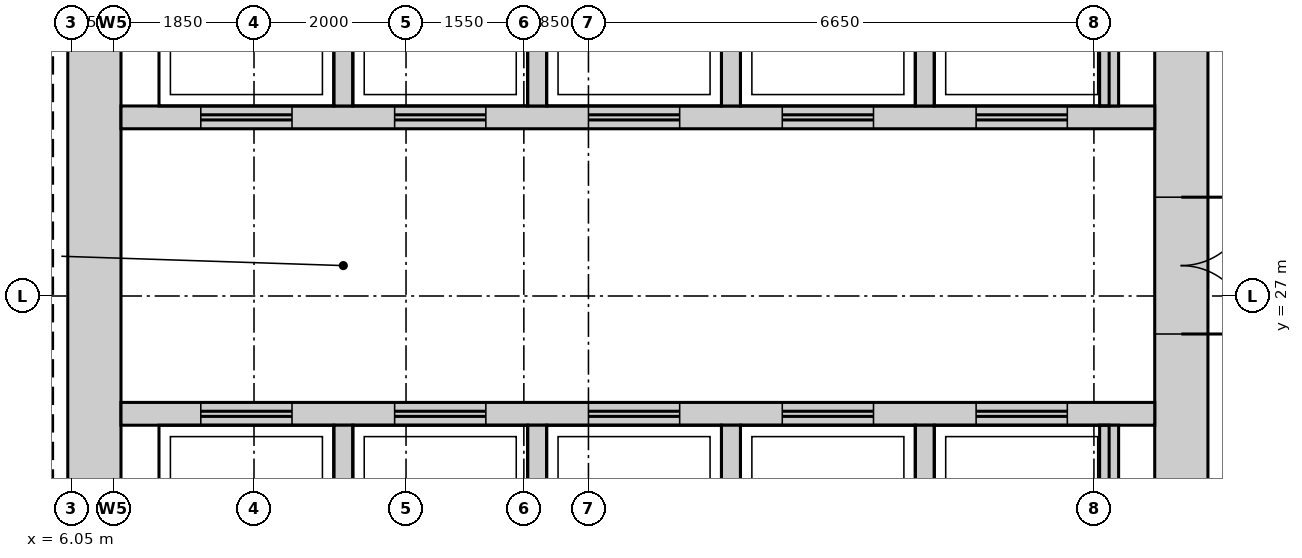
"""IFC4 building model, lengths in metres.
Left out: names, types, materials, properties, quantities, classifications, styles, units other than length and angle.
Written with IfcOpenShell. Run it as: python <this file> out.ifc"""

import sys

from ifc_helpers import new_model, si_unit, direction, frame, frame_2d, origin, place, context, subcontext, project, spatial, rectangle, extrude, source, transform, mapped, element, fill, save


model = new_model("IFC4")
c1 = context("Model", 3, precision=1e-05, world=origin(), true_north=direction((0.0, 1.0)))
c2 = subcontext(c1, "Body", "Model", "MODEL_VIEW")
j1 = project(units=[si_unit("LENGTHUNIT", "METRE"), si_unit("PLANEANGLEUNIT", "RADIAN")], contexts=[c1])
p1 = place(None, origin())
s1 = spatial("IfcSite", under=j1, at=p1, CompositionType="ELEMENT")
p2 = place(p1, origin())
s2 = spatial("IfcBuilding", under=s1, at=p2, CompositionType="ELEMENT")
p3 = place(p2, frame((0.0, 0.0, 254.2)))
s3 = spatial("IfcBuildingStorey", under=s2, at=p3, CompositionType="ELEMENT", Elevation=254.2)
m1 = source(origin(), c2, "Body", "SweptSolid", [
    extrude(rectangle(XDim=22.6, YDim=0.7, at=frame_2d((11.3, 0.0))), origin(), (0.0, 0.0, 1.0), 3.75),
])
p4 = place(p3, frame((20.65, 15.7, 0.0), z_axis=(0.0, 0.0, 1.0), x_axis=(0.0, 1.0, 0.0)))
e1 = element("IfcWall", 1, at=p4, inside=s3, PredefinedType="SHEAR", context=c2, shape_type="MappedRepresentation", body=[
    mapped(m1, transform((0.0, 0.0, 0.0))),
])
m2 = source(origin(), c2, "Body", "SweptSolid", [
    extrude(rectangle(XDim=1.8, YDim=2.1, at=frame_2d((0.9, 1.05))), frame((0.0, 0.36, 0.0), z_axis=(0.0, -1.0, 0.0), x_axis=(1.0, 0.0, 0.0)), (0.0, 0.0, 1.0), 0.72),
])
p5 = place(p4, frame((10.8, 0.0, 0.0)))
e2 = element("IfcOpeningElement", 2, at=p5, cuts=e1, PredefinedType="OPENING", context=c2, shape_type="MappedRepresentation", body=[
    mapped(m2, transform((0.0, 0.0, 0.0))),
])
m3 = source(origin(), c2, "Body", "SweptSolid", [
    extrude(rectangle(XDim=0.9, YDim=2.1, at=frame_2d((0.45, 1.05))), frame((0.0, 0.36, 0.0), z_axis=(0.0, -1.0, 0.0), x_axis=(1.0, 0.0, 0.0)), (0.0, 0.0, 1.0), 0.72),
])
p6 = place(p4, frame((0.45, 0.0, 0.0)))
e3 = element("IfcOpeningElement", 3, at=p6, cuts=e1, PredefinedType="OPENING", context=c2, shape_type="MappedRepresentation", body=[
    mapped(m3, transform((0.0, 0.0, 0.0))),
])
p7 = place(p4, frame((2.9, 0.0, 0.0)))
e4 = element("IfcOpeningElement", 4, at=p7, cuts=e1, PredefinedType="OPENING", context=c2, shape_type="MappedRepresentation", body=[
    mapped(m3, transform((0.0, 0.0, 0.0))),
])
p8 = place(p4, frame((5.65, 0.0, 0.0)))
e5 = element("IfcOpeningElement", 5, at=p8, cuts=e1, PredefinedType="OPENING", context=c2, shape_type="MappedRepresentation", body=[
    mapped(m3, transform((0.0, 0.0, 0.0))),
])
p9 = place(p3, frame((6.35, 15.7, 0.0), z_axis=(0.0, 0.0, 1.0), x_axis=(0.0, 1.0, 0.0)))
e6 = element("IfcWall", 6, at=p9, inside=s3, PredefinedType="SHEAR", context=c2, shape_type="MappedRepresentation", body=[
    mapped(m1, transform((0.0, 0.0, 0.0))),
])
m4 = source(origin(), c2, "Body", "SweptSolid", [
    extrude(rectangle(XDim=13.6, YDim=0.3, at=frame_2d((6.8, 0.0))), origin(), (0.0, 0.0, 1.0), 3.75),
])
p10 = place(p3, frame((6.7, 29.35, 0.0), z_axis=(0.0, 0.0, 1.0), x_axis=(1.0, 0.0, 0.0)))
e7 = element("IfcWall", 7, at=p10, inside=s3, PredefinedType="STANDARD", context=c2, shape_type="MappedRepresentation", body=[
    mapped(m4, transform((0.0, 0.0, 0.0))),
])
m5 = source(origin(), c2, "Body", "SweptSolid", [
    extrude(rectangle(XDim=1.2, YDim=2.1, at=frame_2d((0.6, 1.05))), frame((0.0, 0.16, 0.0), z_axis=(0.0, -1.0, 0.0), x_axis=(1.0, 0.0, 0.0)), (0.0, 0.0, 1.0), 0.32),
])
p11 = place(p10, frame((1.05, 0.0, 0.0)))
e8 = element("IfcOpeningElement", 8, at=p11, cuts=e7, PredefinedType="OPENING", context=c2, shape_type="MappedRepresentation", body=[
    mapped(m5, transform((0.0, 0.0, 0.0))),
])
p12 = place(p10, frame((3.6, 0.0, 0.0)))
e9 = element("IfcOpeningElement", 9, at=p12, cuts=e7, PredefinedType="OPENING", context=c2, shape_type="MappedRepresentation", body=[
    mapped(m5, transform((0.0, 0.0, 0.0))),
])
p13 = place(p10, frame((6.15, 0.0, 0.0)))
e10 = element("IfcOpeningElement", 10, at=p13, cuts=e7, PredefinedType="OPENING", context=c2, shape_type="MappedRepresentation", body=[
    mapped(m5, transform((0.0, 0.0, 0.0))),
])
p14 = place(p10, frame((8.7, 0.0, 0.0)))
e11 = element("IfcOpeningElement", 11, at=p14, cuts=e7, PredefinedType="OPENING", context=c2, shape_type="MappedRepresentation", body=[
    mapped(m5, transform((0.0, 0.0, 0.0))),
])
p15 = place(p10, frame((11.25, 0.0, 0.0)))
e12 = element("IfcOpeningElement", 12, at=p15, cuts=e7, PredefinedType="OPENING", context=c2, shape_type="MappedRepresentation", body=[
    mapped(m5, transform((0.0, 0.0, 0.0))),
])
p16 = place(p3, frame((6.7, 25.45, 0.0), z_axis=(0.0, 0.0, 1.0), x_axis=(1.0, 0.0, 0.0)))
e13 = element("IfcWall", 13, at=p16, inside=s3, PredefinedType="STANDARD", context=c2, shape_type="MappedRepresentation", body=[
    mapped(m4, transform((0.0, 0.0, 0.0))),
])
p17 = place(p16, frame((1.05, 0.0, 0.0)))
e14 = element("IfcOpeningElement", 14, at=p17, cuts=e13, PredefinedType="OPENING", context=c2, shape_type="MappedRepresentation", body=[
    mapped(m5, transform((0.0, 0.0, 0.0))),
])
p18 = place(p16, frame((3.6, 0.0, 0.0)))
e15 = element("IfcOpeningElement", 15, at=p18, cuts=e13, PredefinedType="OPENING", context=c2, shape_type="MappedRepresentation", body=[
    mapped(m5, transform((0.0, 0.0, 0.0))),
])
p19 = place(p16, frame((6.15, 0.0, 0.0)))
e16 = element("IfcOpeningElement", 16, at=p19, cuts=e13, PredefinedType="OPENING", context=c2, shape_type="MappedRepresentation", body=[
    mapped(m5, transform((0.0, 0.0, 0.0))),
])
p20 = place(p16, frame((8.7, 0.0, 0.0)))
e17 = element("IfcOpeningElement", 17, at=p20, cuts=e13, PredefinedType="OPENING", context=c2, shape_type="MappedRepresentation", body=[
    mapped(m5, transform((0.0, 0.0, 0.0))),
])
p21 = place(p16, frame((11.25, 0.0, 0.0)))
e18 = element("IfcOpeningElement", 18, at=p21, cuts=e13, PredefinedType="OPENING", context=c2, shape_type="MappedRepresentation", body=[
    mapped(m5, transform((0.0, 0.0, 0.0))),
])
m6 = source(origin(), c2, "Body", "SweptSolid", [
    extrude(rectangle(XDim=2.4, YDim=0.25, at=frame_2d((1.2, 0.0))), origin(), (0.0, 0.0, 1.0), 3.75),
])
for number, where, z_axis, x_axis in (
    (19, (17.275, 29.5, 0.0), (0.0, 0.0, 1.0), (0.0, 1.0, 0.0)),
    (20, (19.7, 29.5, 0.0), (0.0, 0.0, 1.0), (0.0, 1.0, 0.0)),
    (21, (9.625, 29.5, 0.0), (0.0, 0.0, 1.0), (0.0, 1.0, 0.0)),
    (22, (12.175, 29.5, 0.0), (0.0, 0.0, 1.0), (0.0, 1.0, 0.0)),
    (23, (14.725, 29.5, 0.0), (0.0, 0.0, 1.0), (0.0, 1.0, 0.0)),
):
    element("IfcWall", number, at=place(p3, frame(where, z_axis=z_axis, x_axis=x_axis)), inside=s3, PredefinedType="STANDARD", context=c2, shape_type="MappedRepresentation", body=[
        mapped(m6, transform((0.0, 0.0, 0.0))),
    ])
m7 = source(origin(), c2, "Body", "SweptSolid", [
    extrude(rectangle(XDim=2.4, YDim=0.25, at=frame_2d((1.2, 0.0))), origin(), (0.0, 0.0, 1.0), 3.75),
])
for number, where, z_axis, x_axis in (
    (24, (17.275, 22.9, 0.0), (0.0, 0.0, 1.0), (0.0, 1.0, 0.0)),
    (25, (19.7, 22.9, 0.0), (0.0, 0.0, 1.0), (0.0, 1.0, 0.0)),
    (26, (9.625, 22.9, 0.0), (0.0, 0.0, 1.0), (0.0, 1.0, 0.0)),
    (27, (12.175, 22.9, 0.0), (0.0, 0.0, 1.0), (0.0, 1.0, 0.0)),
    (28, (14.725, 22.9, 0.0), (0.0, 0.0, 1.0), (0.0, 1.0, 0.0)),
):
    element("IfcWall", number, at=place(p3, frame(where, z_axis=z_axis, x_axis=x_axis)), inside=s3, PredefinedType="STANDARD", context=c2, shape_type="MappedRepresentation", body=[
        mapped(m7, transform((0.0, 0.0, 0.0))),
    ])
m8 = source(origin(), c2, "Body", "SweptSolid", [
    extrude(rectangle(XDim=1.8, YDim=2.1, at=frame_2d((0.9, 1.05))), frame((0.0, 0.3, 0.0), z_axis=(0.0, -1.0, 0.0), x_axis=(1.0, 0.0, 0.0)), (0.0, 0.0, 1.0), 0.6),
])
p22 = place(p5, origin())
e29 = element("IfcDoor", 29, at=p22, inside=s3, OperationType="DOUBLE_DOOR_SINGLE_SWING", PredefinedType="DOOR", context=c2, shape_type="MappedRepresentation", body=[
    mapped(m8, transform((0.0, 0.0, 0.0))),
])
fill(e2, e29)
m9 = source(origin(), c2, "Body", "SweptSolid", [
    extrude(rectangle(XDim=1.2, YDim=2.1, at=frame_2d((0.6, 1.05))), frame((0.0, 0.025, 0.0), z_axis=(0.0, -1.0, 0.0), x_axis=(1.0, 0.0, 0.0)), (0.0, 0.0, 1.0), 0.05),
])
p23 = place(p17, origin())
e30 = element("IfcDoor", 30, at=p23, inside=s3, OperationType="DOUBLE_DOOR_SLIDING", PredefinedType="DOOR", context=c2, shape_type="MappedRepresentation", body=[
    mapped(m9, transform((0.0, 0.0, 0.0))),
])
fill(e14, e30)
p24 = place(p18, origin())
e31 = element("IfcDoor", 31, at=p24, inside=s3, OperationType="DOUBLE_DOOR_SLIDING", PredefinedType="DOOR", context=c2, shape_type="MappedRepresentation", body=[
    mapped(m9, transform((0.0, 0.0, 0.0))),
])
fill(e15, e31)
p25 = place(p19, origin())
e32 = element("IfcDoor", 32, at=p25, inside=s3, OperationType="DOUBLE_DOOR_SLIDING", PredefinedType="DOOR", context=c2, shape_type="MappedRepresentation", body=[
    mapped(m9, transform((0.0, 0.0, 0.0))),
])
fill(e16, e32)
p26 = place(p20, origin())
e33 = element("IfcDoor", 33, at=p26, inside=s3, OperationType="DOUBLE_DOOR_SLIDING", PredefinedType="DOOR", context=c2, shape_type="MappedRepresentation", body=[
    mapped(m9, transform((0.0, 0.0, 0.0))),
])
fill(e17, e33)
p27 = place(p21, origin())
e34 = element("IfcDoor", 34, at=p27, inside=s3, OperationType="DOUBLE_DOOR_SLIDING", PredefinedType="DOOR", context=c2, shape_type="MappedRepresentation", body=[
    mapped(m9, transform((0.0, 0.0, 0.0))),
])
fill(e18, e34)
p28 = place(p11, origin())
e35 = element("IfcDoor", 35, at=p28, inside=s3, OperationType="DOUBLE_DOOR_SLIDING", PredefinedType="DOOR", context=c2, shape_type="MappedRepresentation", body=[
    mapped(m9, transform((0.0, 0.0, 0.0))),
])
fill(e8, e35)
p29 = place(p12, origin())
e36 = element("IfcDoor", 36, at=p29, inside=s3, OperationType="DOUBLE_DOOR_SLIDING", PredefinedType="DOOR", context=c2, shape_type="MappedRepresentation", body=[
    mapped(m9, transform((0.0, 0.0, 0.0))),
])
fill(e9, e36)
p30 = place(p13, origin())
e37 = element("IfcDoor", 37, at=p30, inside=s3, OperationType="DOUBLE_DOOR_SLIDING", PredefinedType="DOOR", context=c2, shape_type="MappedRepresentation", body=[
    mapped(m9, transform((0.0, 0.0, 0.0))),
])
fill(e10, e37)
p31 = place(p14, origin())
e38 = element("IfcDoor", 38, at=p31, inside=s3, OperationType="DOUBLE_DOOR_SLIDING", PredefinedType="DOOR", context=c2, shape_type="MappedRepresentation", body=[
    mapped(m9, transform((0.0, 0.0, 0.0))),
])
fill(e11, e38)
p32 = place(p15, origin())
e39 = element("IfcDoor", 39, at=p32, inside=s3, OperationType="DOUBLE_DOOR_SLIDING", PredefinedType="DOOR", context=c2, shape_type="MappedRepresentation", body=[
    mapped(m9, transform((0.0, 0.0, 0.0))),
])
fill(e12, e39)
save(model, sys.argv[1])
